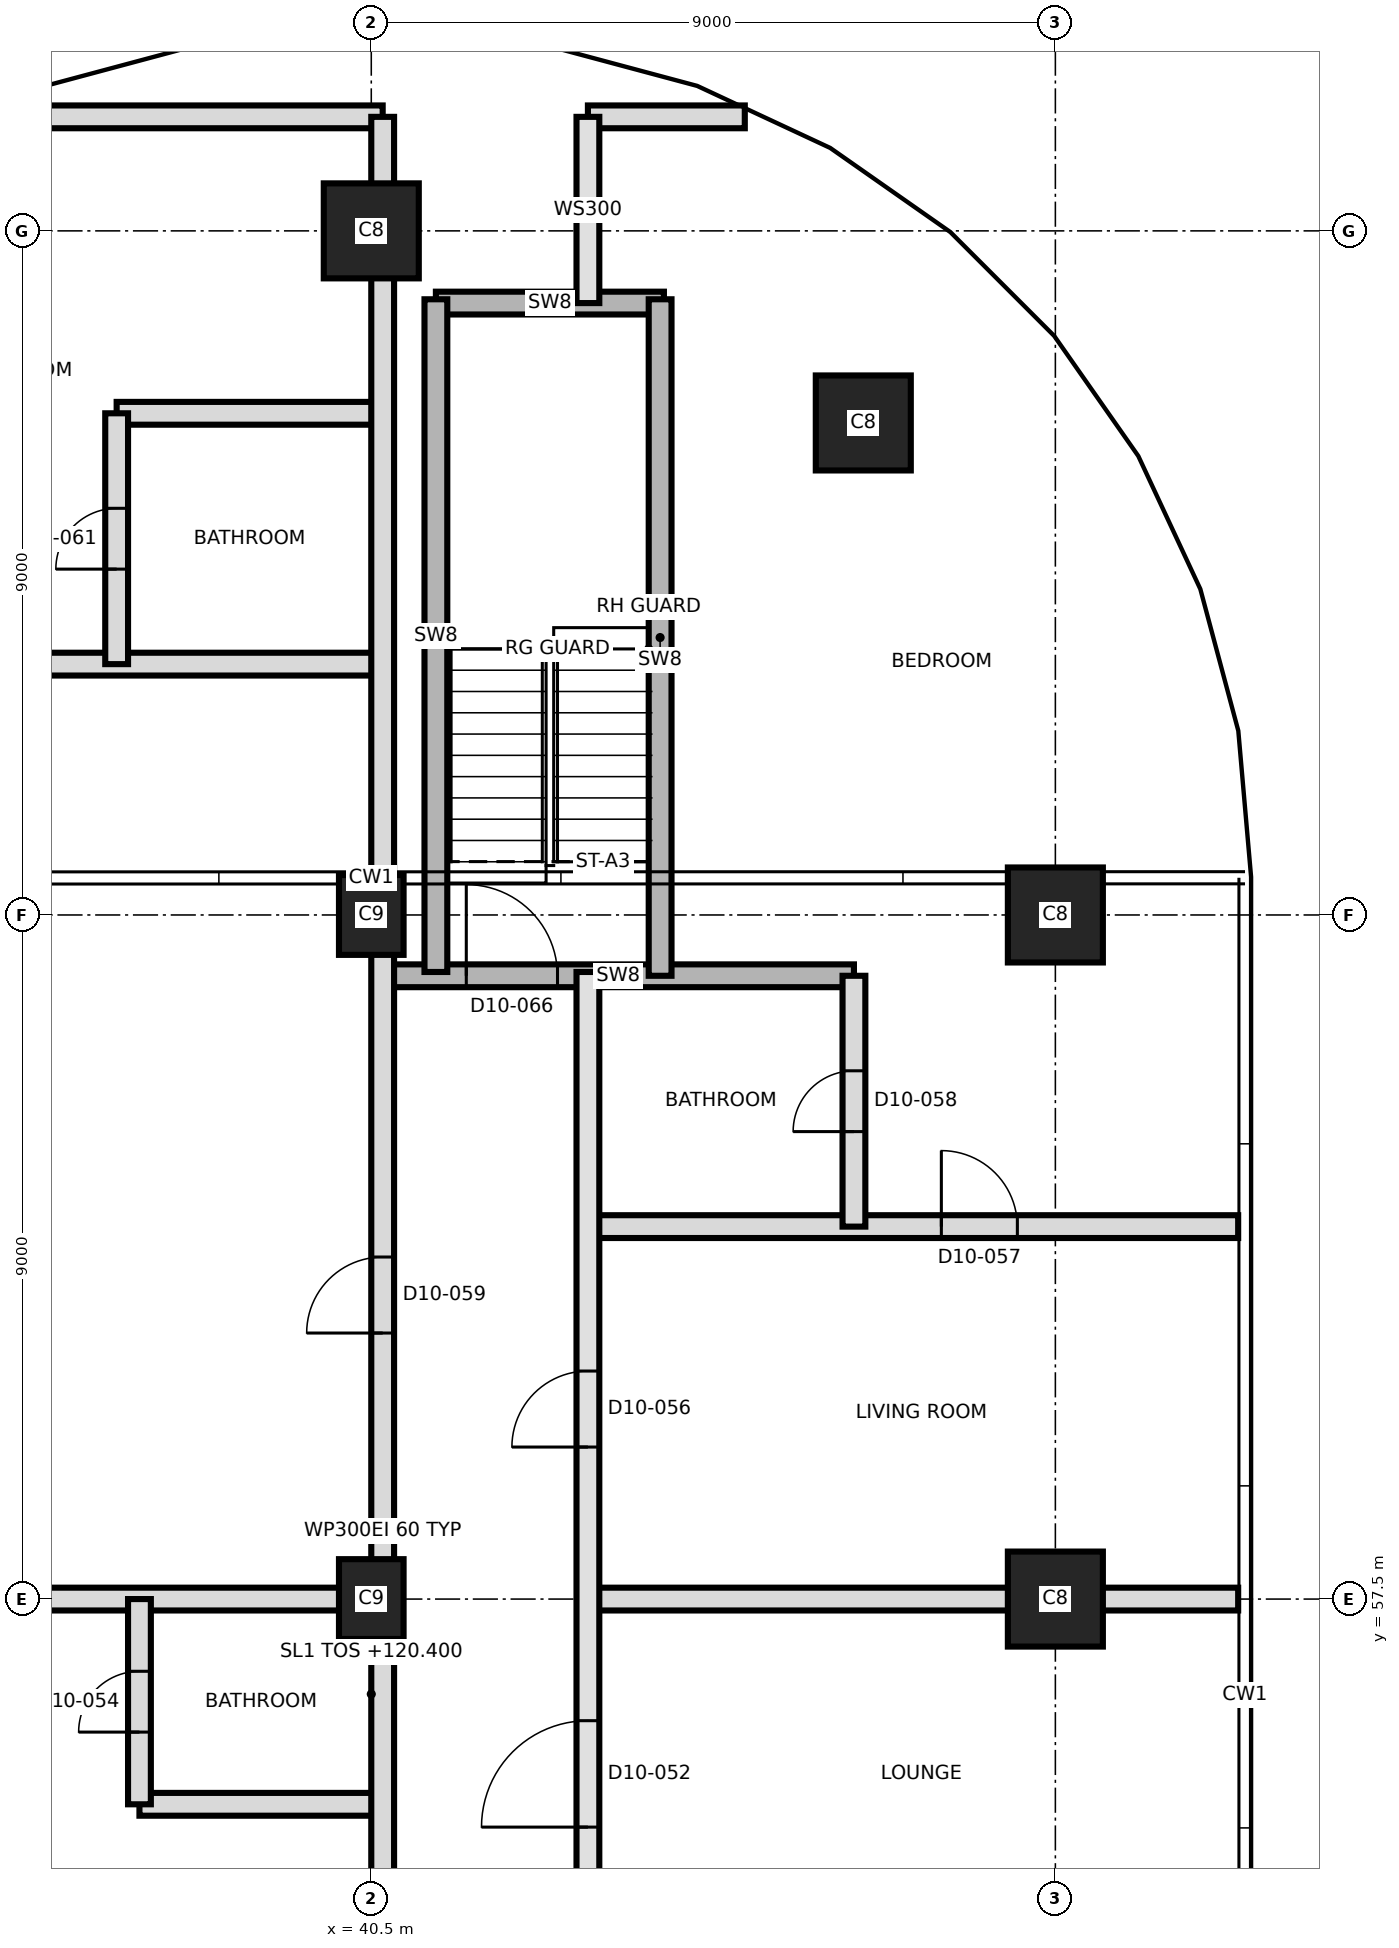
"""IFC4 building model, lengths in metres.
Left out: names, types, materials, properties, quantities, classifications, styles, units other than length and angle.
Written with IfcOpenShell. Run it as: python <this file> out.ifc"""

import sys

from ifc_helpers import new_model, si_unit, direction, frame, frame_2d, origin, origin_2d, place, context, subcontext, project, spatial, rectangle, extrude, element, fill, save


model = new_model("IFC4")
c1 = context("Model", 3, precision=1e-05, world=origin(), true_north=direction((0.0, 1.0)))
c2 = subcontext(c1, "Body", "Model", "MODEL_VIEW")
j1 = project(units=[si_unit("LENGTHUNIT", "METRE"), si_unit("PLANEANGLEUNIT", "RADIAN")], contexts=[c1])
p1 = place(None, origin())
s1 = spatial("IfcSite", under=j1, at=p1, CompositionType="ELEMENT")
p2 = place(p1, origin())
s2 = spatial("IfcBuilding", under=s1, at=p2, CompositionType="ELEMENT")
p3 = place(p2, frame((0.0, 0.0, 120.4)))
s3 = spatial("IfcBuildingStorey", under=s2, at=p3, CompositionType="ELEMENT", Elevation=120.4)
p4 = place(p3, frame((40.5, 57.5, 0.0), z_axis=(0.0, 0.0, 1.0), x_axis=(0.0, 1.0, 0.0)))
e1 = element("IfcColumn", 1, at=p4, inside=s3, PredefinedType="COLUMN", context=c2, shape_type="SweptSolid", body=[
    extrude(rectangle(XDim=1.05, YDim=0.85, at=origin_2d()), origin(), (0.0, 0.0, 1.0), 3.7),
])
p5 = place(p3, frame((49.5, 57.5, 0.0), z_axis=(0.0, 0.0, 1.0), x_axis=(1.0, 0.0, 0.0)))
e2 = element("IfcColumn", 2, at=p5, inside=s3, PredefinedType="COLUMN", context=c2, shape_type="SweptSolid", body=[
    extrude(rectangle(XDim=1.25, YDim=1.25, at=origin_2d()), origin(), (0.0, 0.0, 1.0), 3.7),
])
p6 = place(p3, frame((40.5, 66.5, 0.0), z_axis=(0.0, 0.0, 1.0), x_axis=(0.0, 1.0, 0.0)))
e3 = element("IfcColumn", 3, at=p6, inside=s3, PredefinedType="COLUMN", context=c2, shape_type="SweptSolid", body=[
    extrude(rectangle(XDim=1.05, YDim=0.85, at=origin_2d()), origin(), (0.0, 0.0, 1.0), 3.7),
])
for number, where, z_axis, x_axis in (
    (4, (49.5, 66.5, 0.0), (0.0, 0.0, 1.0), (1.0, 0.0, 0.0)),
    (5, (46.973, 72.973, 0.0), (0.0, 0.0, 1.0), (1.0, 0.0, 0.0)),
    (6, (40.5, 75.5, 0.0), (0.0, 0.0, 1.0), (1.0, 0.0, 0.0)),
):
    element("IfcColumn", number, at=place(p3, frame(where, z_axis=z_axis, x_axis=x_axis)), inside=s3, PredefinedType="COLUMN", context=c2, shape_type="SweptSolid", body=[
        extrude(rectangle(XDim=1.25, YDim=1.25, at=origin_2d()), origin(), (0.0, 0.0, 1.0), 3.7),
    ])
p7 = place(p3, frame((37.45, 54.8, 0.0), z_axis=(0.0, 0.0, 1.0), x_axis=(1.0, 0.0, 0.0)))
e7 = element("IfcWall", 7, at=p7, inside=s3, PredefinedType="PARTITIONING", context=c2, shape_type="SweptSolid", body=[
    extrude(rectangle(XDim=3.2, YDim=0.3, at=frame_2d((1.6, 0.0))), origin(), (0.0, 0.0, 1.0), 3.4),
])
p8 = place(p3, frame((29.275, 57.5, 0.0), z_axis=(0.0, 0.0, 1.0), x_axis=(1.0, 0.0, 0.0)))
e8 = element("IfcWall", 8, at=p8, inside=s3, PredefinedType="PARTITIONING", context=c2, shape_type="SweptSolid", body=[
    extrude(rectangle(XDim=11.375, YDim=0.3, at=frame_2d((5.688, 0.0))), origin(), (0.0, 0.0, 1.0), 3.35),
])
p9 = place(p3, frame((43.35, 57.5, 0.0), z_axis=(0.0, 0.0, 1.0), x_axis=(1.0, 0.0, 0.0)))
e9 = element("IfcWall", 9, at=p9, inside=s3, PredefinedType="PARTITIONING", context=c2, shape_type="SweptSolid", body=[
    extrude(rectangle(XDim=8.555, YDim=0.3, at=frame_2d((4.277, 0.0))), origin(), (0.0, 0.0, 1.0), 3.35),
])
p10 = place(p3, frame((43.35, 62.4, 0.0), z_axis=(0.0, 0.0, 1.0), x_axis=(1.0, 0.0, 0.0)))
e10 = element("IfcWall", 10, at=p10, inside=s3, PredefinedType="PARTITIONING", context=c2, shape_type="SweptSolid", body=[
    extrude(rectangle(XDim=8.555, YDim=0.3, at=frame_2d((4.277, 0.0))), origin(), (0.0, 0.0, 1.0), 3.35),
])
p11 = place(p10, frame((4.65, 0.0, 0.0)))
e11 = element("IfcOpeningElement", 11, at=p11, cuts=e10, PredefinedType="OPENING", context=c2, shape_type="SweptSolid", body=[
    extrude(rectangle(XDim=1.0, YDim=2.1, at=frame_2d((0.5, 1.05))), frame((0.0, 0.16, 0.0), z_axis=(0.0, -1.0, 0.0), x_axis=(1.0, 0.0, 0.0)), (0.0, 0.0, 1.0), 0.32),
])
p12 = place(p3, frame((40.65, 65.7, 0.0), z_axis=(0.0, 0.0, 1.0), x_axis=(1.0, 0.0, 0.0)))
e12 = element("IfcWall", 12, at=p12, inside=s3, PredefinedType="SHEAR", context=c2, shape_type="SweptSolid", body=[
    extrude(rectangle(XDim=6.2, YDim=0.3, at=frame_2d((3.1, 0.0))), origin(), (0.0, 0.0, 1.0), 3.4),
])
p13 = place(p12, frame((1.1, 0.0, 0.0)))
e13 = element("IfcOpeningElement", 13, at=p13, cuts=e12, PredefinedType="OPENING", context=c2, shape_type="SweptSolid", body=[
    extrude(rectangle(XDim=1.2, YDim=2.1, at=frame_2d((0.6, 1.05))), frame((0.0, 0.16, 0.0), z_axis=(0.0, -1.0, 0.0), x_axis=(1.0, 0.0, 0.0)), (0.0, 0.0, 1.0), 0.32),
])
p14 = place(p3, frame((29.442, 69.8, 0.0), z_axis=(0.0, 0.0, 1.0), x_axis=(1.0, 0.0, 0.0)))
e14 = element("IfcWall", 14, at=p14, inside=s3, PredefinedType="PARTITIONING", context=c2, shape_type="SweptSolid", body=[
    extrude(rectangle(XDim=11.208, YDim=0.3, at=frame_2d((5.604, 0.0))), origin(), (0.0, 0.0, 1.0), 3.35),
])
p15 = place(p14, frame((5.558, 0.0, 0.0)))
e15 = element("IfcOpeningElement", 15, at=p15, cuts=e14, PredefinedType="OPENING", context=c2, shape_type="SweptSolid", body=[
    extrude(rectangle(XDim=1.0, YDim=2.1, at=frame_2d((0.5, 1.05))), frame((0.0, 0.16, 0.0), z_axis=(0.0, -1.0, 0.0), x_axis=(1.0, 0.0, 0.0)), (0.0, 0.0, 1.0), 0.32),
])
p16 = place(p3, frame((37.15, 73.1, 0.0), z_axis=(0.0, 0.0, 1.0), x_axis=(1.0, 0.0, 0.0)))
e16 = element("IfcWall", 16, at=p16, inside=s3, PredefinedType="PARTITIONING", context=c2, shape_type="SweptSolid", body=[
    extrude(rectangle(XDim=3.5, YDim=0.3, at=frame_2d((1.75, 0.0))), origin(), (0.0, 0.0, 1.0), 3.4),
])
p17 = place(p3, frame((41.35, 74.55, 0.0), z_axis=(0.0, 0.0, 1.0), x_axis=(1.0, 0.0, 0.0)))
e17 = element("IfcWall", 17, at=p17, inside=s3, PredefinedType="SHEAR", context=c2, shape_type="SweptSolid", body=[
    extrude(rectangle(XDim=3.0, YDim=0.3, at=frame_2d((1.5, 0.0))), origin(), (0.0, 0.0, 1.0), 3.4),
])
p18 = place(p3, frame((35.586, 77.0, 0.0), z_axis=(0.0, 0.0, 1.0), x_axis=(1.0, 0.0, 0.0)))
e18 = element("IfcWall", 18, at=p18, inside=s3, PredefinedType="PARTITIONING", context=c2, shape_type="SweptSolid", body=[
    extrude(rectangle(XDim=5.064, YDim=0.3, at=frame_2d((2.532, 0.0))), origin(), (0.0, 0.0, 1.0), 3.35),
])
p19 = place(p3, frame((43.35, 77.0, 0.0), z_axis=(0.0, 0.0, 1.0), x_axis=(1.0, 0.0, 0.0)))
e19 = element("IfcWall", 19, at=p19, inside=s3, PredefinedType="PARTITIONING", context=c2, shape_type="SweptSolid", body=[
    extrude(rectangle(XDim=2.064, YDim=0.3, at=frame_2d((1.032, 0.0))), origin(), (0.0, 0.0, 1.0), 3.35),
])
p20 = place(p3, frame((37.15, 69.8, 0.0), z_axis=(0.0, 0.0, 1.0), x_axis=(0.0, 1.0, 0.0)))
e20 = element("IfcWall", 20, at=p20, inside=s3, PredefinedType="PARTITIONING", context=c2, shape_type="SweptSolid", body=[
    extrude(rectangle(XDim=3.3, YDim=0.3, at=frame_2d((1.65, 0.0))), origin(), (0.0, 0.0, 1.0), 3.4),
])
p21 = place(p20, frame((1.25, 0.0, 0.0)))
e21 = element("IfcOpeningElement", 21, at=p21, cuts=e20, PredefinedType="OPENING", context=c2, shape_type="SweptSolid", body=[
    extrude(rectangle(XDim=0.8, YDim=2.1, at=frame_2d((0.4, 1.05))), frame((0.0, 0.16, 0.0), z_axis=(0.0, -1.0, 0.0), x_axis=(1.0, 0.0, 0.0)), (0.0, 0.0, 1.0), 0.32),
])
p22 = place(p3, frame((37.45, 54.8, 0.0), z_axis=(0.0, 0.0, 1.0), x_axis=(0.0, 1.0, 0.0)))
e22 = element("IfcWall", 22, at=p22, inside=s3, PredefinedType="PARTITIONING", context=c2, shape_type="SweptSolid", body=[
    extrude(rectangle(XDim=2.7, YDim=0.3, at=frame_2d((1.35, 0.0))), origin(), (0.0, 0.0, 1.0), 3.4),
])
p23 = place(p22, frame((0.95, 0.0, 0.0)))
e23 = element("IfcOpeningElement", 23, at=p23, cuts=e22, PredefinedType="OPENING", context=c2, shape_type="SweptSolid", body=[
    extrude(rectangle(XDim=0.8, YDim=2.1, at=frame_2d((0.4, 1.05))), frame((0.0, 0.16, 0.0), z_axis=(0.0, -1.0, 0.0), x_axis=(1.0, 0.0, 0.0)), (0.0, 0.0, 1.0), 0.32),
])
p24 = place(p3, frame((40.65, 39.8, 0.0), z_axis=(0.0, 0.0, 1.0), x_axis=(0.0, 1.0, 0.0)))
e24 = element("IfcWall", 24, at=p24, inside=s3, PredefinedType="PARTITIONING", context=c2, shape_type="SweptSolid", body=[
    extrude(rectangle(XDim=37.2, YDim=0.3, at=frame_2d((18.6, 0.0))), origin(), (0.0, 0.0, 1.0), 3.35),
])
p25 = place(p24, frame((0.835, 0.0, 0.0)))
e25 = element("IfcOpeningElement", 25, at=p25, cuts=e24, PredefinedType="OPENING", context=c2, shape_type="SweptSolid", body=[
    extrude(rectangle(XDim=1.2, YDim=2.1, at=frame_2d((0.6, 1.05))), frame((0.0, 0.16, 0.0), z_axis=(0.0, -1.0, 0.0), x_axis=(1.0, 0.0, 0.0)), (0.0, 0.0, 1.0), 0.32),
])
p26 = place(p24, frame((4.085, 0.0, 0.0)))
e26 = element("IfcOpeningElement", 26, at=p26, cuts=e24, PredefinedType="OPENING", context=c2, shape_type="SweptSolid", body=[
    extrude(rectangle(XDim=1.0, YDim=2.1, at=frame_2d((0.5, 1.05))), frame((0.0, 0.16, 0.0), z_axis=(0.0, -1.0, 0.0), x_axis=(1.0, 0.0, 0.0)), (0.0, 0.0, 1.0), 0.32),
])
p27 = place(p24, frame((9.835, 0.0, 0.0)))
e27 = element("IfcOpeningElement", 27, at=p27, cuts=e24, PredefinedType="OPENING", context=c2, shape_type="SweptSolid", body=[
    extrude(rectangle(XDim=1.2, YDim=2.1, at=frame_2d((0.6, 1.05))), frame((0.0, 0.16, 0.0), z_axis=(0.0, -1.0, 0.0), x_axis=(1.0, 0.0, 0.0)), (0.0, 0.0, 1.0), 0.32),
])
p28 = place(p24, frame((13.085, 0.0, 0.0)))
e28 = element("IfcOpeningElement", 28, at=p28, cuts=e24, PredefinedType="OPENING", context=c2, shape_type="SweptSolid", body=[
    extrude(rectangle(XDim=1.0, YDim=2.1, at=frame_2d((0.5, 1.05))), frame((0.0, 0.16, 0.0), z_axis=(0.0, -1.0, 0.0), x_axis=(1.0, 0.0, 0.0)), (0.0, 0.0, 1.0), 0.32),
])
p29 = place(p24, frame((21.2, 0.0, 0.0)))
e29 = element("IfcOpeningElement", 29, at=p29, cuts=e24, PredefinedType="OPENING", context=c2, shape_type="SweptSolid", body=[
    extrude(rectangle(XDim=1.0, YDim=2.4, at=frame_2d((0.5, 1.2))), frame((0.0, 0.16, 0.0), z_axis=(0.0, -1.0, 0.0), x_axis=(1.0, 0.0, 0.0)), (0.0, 0.0, 1.0), 0.32),
])
p30 = place(p3, frame((41.35, 65.75, 0.0), z_axis=(0.0, 0.0, 1.0), x_axis=(0.0, 1.0, 0.0)))
e30 = element("IfcWall", 30, at=p30, inside=s3, PredefinedType="SHEAR", context=c2, shape_type="SweptSolid", body=[
    extrude(rectangle(XDim=8.85, YDim=0.3, at=frame_2d((4.425, 0.0))), origin(), (0.0, 0.0, 1.0), 3.4),
])
p31 = place(p3, frame((43.35, 39.8, 0.0), z_axis=(0.0, 0.0, 1.0), x_axis=(0.0, 1.0, 0.0)))
e31 = element("IfcWall", 31, at=p31, inside=s3, PredefinedType="SOLIDWALL", context=c2, shape_type="SweptSolid", body=[
    extrude(rectangle(XDim=25.95, YDim=0.3, at=frame_2d((12.975, 0.0))), origin(), (0.0, 0.0, 1.0), 3.4),
])
p32 = place(p31, frame((0.73, 0.0, 0.0)))
e32 = element("IfcOpeningElement", 32, at=p32, cuts=e31, PredefinedType="OPENING", context=c2, shape_type="SweptSolid", body=[
    extrude(rectangle(XDim=1.0, YDim=2.1, at=frame_2d((0.5, 1.05))), frame((0.0, 0.16, 0.0), z_axis=(0.0, -1.0, 0.0), x_axis=(1.0, 0.0, 0.0)), (0.0, 0.0, 1.0), 0.32),
])
p33 = place(p31, frame((6.58, 0.0, 0.0)))
e33 = element("IfcOpeningElement", 33, at=p33, cuts=e31, PredefinedType="OPENING", context=c2, shape_type="SweptSolid", body=[
    extrude(rectangle(XDim=1.0, YDim=2.1, at=frame_2d((0.5, 1.05))), frame((0.0, 0.16, 0.0), z_axis=(0.0, -1.0, 0.0), x_axis=(1.0, 0.0, 0.0)), (0.0, 0.0, 1.0), 0.32),
])
p34 = place(p31, frame((11.75, 0.0, 0.0)))
e34 = element("IfcOpeningElement", 34, at=p34, cuts=e31, PredefinedType="OPENING", context=c2, shape_type="SweptSolid", body=[
    extrude(rectangle(XDim=1.0, YDim=2.1, at=frame_2d((0.5, 1.05))), frame((0.0, 0.16, 0.0), z_axis=(0.0, -1.0, 0.0), x_axis=(1.0, 0.0, 0.0)), (0.0, 0.0, 1.0), 0.32),
])
p35 = place(p31, frame((14.7, 0.0, 0.0)))
e35 = element("IfcOpeningElement", 35, at=p35, cuts=e31, PredefinedType="OPENING", context=c2, shape_type="SweptSolid", body=[
    extrude(rectangle(XDim=1.4, YDim=2.1, at=frame_2d((0.7, 1.05))), frame((0.0, 0.16, 0.0), z_axis=(0.0, -1.0, 0.0), x_axis=(1.0, 0.0, 0.0)), (0.0, 0.0, 1.0), 0.32),
])
p36 = place(p31, frame((19.7, 0.0, 0.0)))
e36 = element("IfcOpeningElement", 36, at=p36, cuts=e31, PredefinedType="OPENING", context=c2, shape_type="SweptSolid", body=[
    extrude(rectangle(XDim=1.0, YDim=2.4, at=frame_2d((0.5, 1.2))), frame((0.0, 0.16, 0.0), z_axis=(0.0, -1.0, 0.0), x_axis=(1.0, 0.0, 0.0)), (0.0, 0.0, 1.0), 0.32),
])
p37 = place(p3, frame((43.35, 74.55, 0.0), z_axis=(0.0, 0.0, 1.0), x_axis=(0.0, 1.0, 0.0)))
e37 = element("IfcWall", 37, at=p37, inside=s3, PredefinedType="SOLIDWALL", context=c2, shape_type="SweptSolid", body=[
    extrude(rectangle(XDim=2.45, YDim=0.3, at=frame_2d((1.225, 0.0))), origin(), (0.0, 0.0, 1.0), 3.35),
])
p38 = place(p3, frame((44.3, 65.7, 0.0), z_axis=(0.0, 0.0, 1.0), x_axis=(0.0, 1.0, 0.0)))
e38 = element("IfcWall", 38, at=p38, inside=s3, PredefinedType="SHEAR", context=c2, shape_type="SweptSolid", body=[
    extrude(rectangle(XDim=8.9, YDim=0.3, at=frame_2d((4.45, 0.0))), origin(), (0.0, 0.0, 1.0), 3.4),
])
p39 = place(p3, frame((46.85, 62.4, 0.0), z_axis=(0.0, 0.0, 1.0), x_axis=(0.0, 1.0, 0.0)))
e39 = element("IfcWall", 39, at=p39, inside=s3, PredefinedType="PARTITIONING", context=c2, shape_type="SweptSolid", body=[
    extrude(rectangle(XDim=3.3, YDim=0.3, at=frame_2d((1.65, 0.0))), origin(), (0.0, 0.0, 1.0), 3.4),
])
p40 = place(p39, frame((1.25, 0.0, 0.0)))
e40 = element("IfcOpeningElement", 40, at=p40, cuts=e39, PredefinedType="OPENING", context=c2, shape_type="SweptSolid", body=[
    extrude(rectangle(XDim=0.8, YDim=2.1, at=frame_2d((0.4, 1.05))), frame((0.0, 0.16, 0.0), z_axis=(0.0, -1.0, 0.0), x_axis=(1.0, 0.0, 0.0)), (0.0, 0.0, 1.0), 0.32),
])
p41 = place(p35, origin())
e41 = element("IfcDoor", 41, at=p41, inside=s3, OperationType="SINGLE_SWING_RIGHT", PredefinedType="DOOR", context=c2, shape_type="SweptSolid", body=[
    extrude(rectangle(XDim=1.4, YDim=2.1, at=frame_2d((0.7, 1.05))), frame((0.0, 0.025, 0.0), z_axis=(0.0, -1.0, 0.0), x_axis=(1.0, 0.0, 0.0)), (0.0, 0.0, 1.0), 0.05),
])
fill(e35, e41)
p42 = place(p23, origin())
e42 = element("IfcDoor", 42, at=p42, inside=s3, OperationType="SINGLE_SWING_RIGHT", PredefinedType="DOOR", context=c2, shape_type="SweptSolid", body=[
    extrude(rectangle(XDim=0.8, YDim=2.1, at=frame_2d((0.4, 1.05))), frame((0.0, 0.025, 0.0), z_axis=(0.0, -1.0, 0.0), x_axis=(1.0, 0.0, 0.0)), (0.0, 0.0, 1.0), 0.05),
])
fill(e23, e42)
p43 = place(p36, origin())
e43 = element("IfcDoor", 43, at=p43, inside=s3, OperationType="SINGLE_SWING_LEFT", PredefinedType="DOOR", context=c2, shape_type="SweptSolid", body=[
    extrude(rectangle(XDim=1.0, YDim=2.4, at=frame_2d((0.5, 1.2))), frame((0.0, 0.025, 0.0), z_axis=(0.0, -1.0, 0.0), x_axis=(1.0, 0.0, 0.0)), (0.0, 0.0, 1.0), 0.05),
])
fill(e36, e43)
p44 = place(p11, origin())
e44 = element("IfcDoor", 44, at=p44, inside=s3, OperationType="SINGLE_SWING_LEFT", PredefinedType="DOOR", context=c2, shape_type="SweptSolid", body=[
    extrude(rectangle(XDim=1.0, YDim=2.1, at=frame_2d((0.5, 1.05))), frame((0.0, 0.025, 0.0), z_axis=(0.0, -1.0, 0.0), x_axis=(1.0, 0.0, 0.0)), (0.0, 0.0, 1.0), 0.05),
])
fill(e11, e44)
p45 = place(p40, origin())
e45 = element("IfcDoor", 45, at=p45, inside=s3, OperationType="SINGLE_SWING_RIGHT", PredefinedType="DOOR", context=c2, shape_type="SweptSolid", body=[
    extrude(rectangle(XDim=0.8, YDim=2.1, at=frame_2d((0.4, 1.05))), frame((0.0, 0.025, 0.0), z_axis=(0.0, -1.0, 0.0), x_axis=(1.0, 0.0, 0.0)), (0.0, 0.0, 1.0), 0.05),
])
fill(e40, e45)
p46 = place(p29, origin())
e46 = element("IfcDoor", 46, at=p46, inside=s3, OperationType="SINGLE_SWING_LEFT", PredefinedType="DOOR", context=c2, shape_type="SweptSolid", body=[
    extrude(rectangle(XDim=1.0, YDim=2.4, at=frame_2d((0.5, 1.2))), frame((0.0, 0.025, 0.0), z_axis=(0.0, -1.0, 0.0), x_axis=(1.0, 0.0, 0.0)), (0.0, 0.0, 1.0), 0.05),
])
fill(e29, e46)
p47 = place(p21, origin())
e47 = element("IfcDoor", 47, at=p47, inside=s3, OperationType="SINGLE_SWING_RIGHT", PredefinedType="DOOR", context=c2, shape_type="SweptSolid", body=[
    extrude(rectangle(XDim=0.8, YDim=2.1, at=frame_2d((0.4, 1.05))), frame((0.0, 0.025, 0.0), z_axis=(0.0, -1.0, 0.0), x_axis=(1.0, 0.0, 0.0)), (0.0, 0.0, 1.0), 0.05),
])
fill(e21, e47)
p48 = place(p13, origin())
e48 = element("IfcDoor", 48, at=p48, inside=s3, OperationType="SINGLE_SWING_RIGHT", PredefinedType="DOOR", context=c2, shape_type="SweptSolid", body=[
    extrude(rectangle(XDim=1.2, YDim=2.1, at=frame_2d((0.6, 1.05))), frame((0.0, 0.025, 0.0), z_axis=(0.0, -1.0, 0.0), x_axis=(1.0, 0.0, 0.0)), (0.0, 0.0, 1.0), 0.05),
])
fill(e13, e48)
save(model, sys.argv[1])
